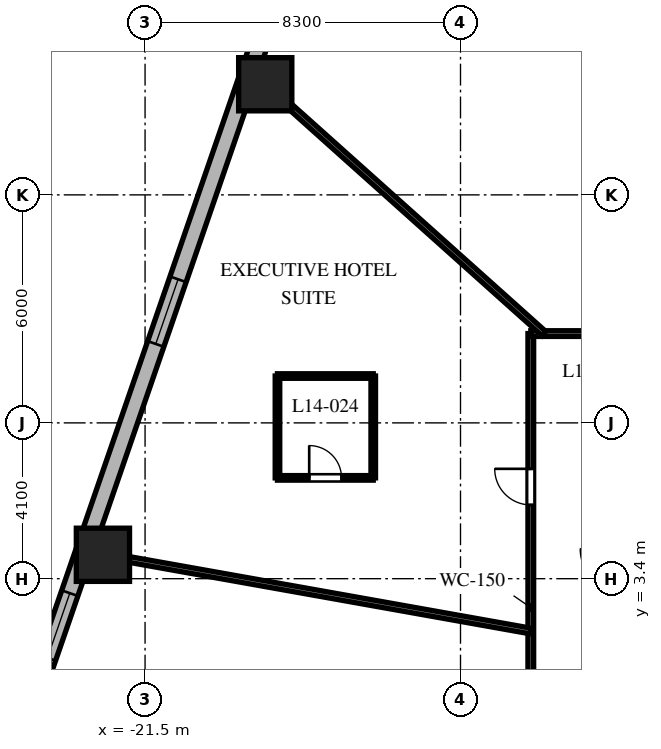
"""IFC4 building model, lengths in metres.
Left out: names, types, materials, properties, quantities, classifications, styles, units other than length and angle.
Written with IfcOpenShell. Run it as: python <this file> out.ifc"""

import sys

from ifc_helpers import new_model, si_unit, direction, frame, frame_2d, origin, origin_2d, place, context, subcontext, project, spatial, rectangle, extrude, element, fill, save


model = new_model("IFC4")
c1 = context("Model", 3, precision=1e-05, world=origin(), true_north=direction((0.0, 1.0)))
c2 = subcontext(c1, "Body", "Model", "MODEL_VIEW")
j1 = project(units=[si_unit("LENGTHUNIT", "METRE"), si_unit("PLANEANGLEUNIT", "RADIAN")], contexts=[c1])
p1 = place(None, origin())
s1 = spatial("IfcSite", under=j1, at=p1, CompositionType="ELEMENT")
p2 = place(p1, origin())
s2 = spatial("IfcBuilding", under=s1, at=p2, CompositionType="ELEMENT")
p3 = place(p2, frame((0.0, 0.0, 63.8)))
s3 = spatial("IfcBuildingStorey", under=s2, at=p3, CompositionType="ELEMENT", Elevation=63.8)
for number, where, z_axis, x_axis in (
    (1, (-18.338, 16.411, 0.0), (0.0, 0.0, 1.0), (1.0, 0.0, 0.0)),
    (2, (-22.609, 4.029, 0.0), (0.0, 0.0, 1.0), (1.0, 0.0, 0.0)),
):
    element("IfcColumn", number, at=place(p3, frame(where, z_axis=z_axis, x_axis=x_axis)), inside=s3, PredefinedType="COLUMN", context=c2, shape_type="SweptSolid", body=[
        extrude(rectangle(XDim=1.4, YDim=1.4, at=origin_2d()), origin(), (0.0, 0.0, 1.0), 3.7),
    ])
p4 = place(p3, frame((-17.39, 20.678, 0.0), z_axis=(0.0, 0.0, 1.0), x_axis=(-0.326068018294, -0.945346310854, 0.0)))
e3 = element("IfcWall", 3, at=p4, inside=s3, PredefinedType="SOLIDWALL", context=c2, shape_type="SweptSolid", body=[
    extrude(rectangle(XDim=21.793, YDim=0.45, at=frame_2d((10.896, 0.0))), origin(), (0.0, 0.0, 1.0), 3.4),
])
p5 = place(p4, frame((1.26, 0.0, 0.8)))
e4 = element("IfcOpeningElement", 4, at=p5, cuts=e3, PredefinedType="OPENING", context=c2, shape_type="SweptSolid", body=[
    extrude(rectangle(XDim=1.8, YDim=1.8, at=frame_2d((0.9, 0.9))), frame((0.0, 0.235, 0.0), z_axis=(0.0, -1.0, 0.0), x_axis=(1.0, 0.0, 0.0)), (0.0, 0.0, 1.0), 0.47),
])
p6 = place(p4, frame((9.943, 0.0, 0.8)))
e5 = element("IfcOpeningElement", 5, at=p6, cuts=e3, PredefinedType="OPENING", context=c2, shape_type="SweptSolid", body=[
    extrude(rectangle(XDim=1.8, YDim=1.8, at=frame_2d((0.9, 0.9))), frame((0.0, 0.235, 0.0), z_axis=(0.0, -1.0, 0.0), x_axis=(1.0, 0.0, 0.0)), (0.0, 0.0, 1.0), 0.47),
])
p7 = place(p4, frame((18.68, 0.0, 0.8)))
e6 = element("IfcOpeningElement", 6, at=p7, cuts=e3, PredefinedType="OPENING", context=c2, shape_type="SweptSolid", body=[
    extrude(rectangle(XDim=1.8, YDim=1.8, at=frame_2d((0.9, 0.9))), frame((0.0, 0.235, 0.0), z_axis=(0.0, -1.0, 0.0), x_axis=(1.0, 0.0, 0.0)), (0.0, 0.0, 1.0), 0.47),
])
p8 = place(p3, frame((-11.35, -9.85, 0.0), z_axis=(0.0, 0.0, 1.0), x_axis=(0.0, 1.0, 0.0)))
e7 = element("IfcWall", 7, at=p8, inside=s3, PredefinedType="PARTITIONING", context=c2, shape_type="SweptSolid", body=[
    extrude(rectangle(XDim=19.7, YDim=0.15, at=frame_2d((9.85, 0.0))), origin(), (0.0, 0.0, 1.0), 2.84),
])
p9 = place(p8, frame((15.191, 0.0, 0.0)))
e8 = element("IfcOpeningElement", 8, at=p9, cuts=e7, PredefinedType="OPENING", context=c2, shape_type="SweptSolid", body=[
    extrude(rectangle(XDim=0.95, YDim=2.03, at=frame_2d((0.475, 1.015))), frame((0.0, 0.085, 0.0), z_axis=(0.0, -1.0, 0.0), x_axis=(1.0, 0.0, 0.0)), (0.0, 0.0, 1.0), 0.17),
])
p10 = place(p8, frame((8.838, 0.0, 0.0)))
e9 = element("IfcOpeningElement", 9, at=p10, cuts=e7, PredefinedType="OPENING", context=c2, shape_type="SweptSolid", body=[
    extrude(rectangle(XDim=0.95, YDim=2.03, at=frame_2d((0.475, 1.015))), frame((0.0, 0.085, 0.0), z_axis=(0.0, -1.0, 0.0), x_axis=(1.0, 0.0, 0.0)), (0.0, 0.0, 1.0), 0.17),
])
p11 = place(p8, frame((4.704, 0.0, 0.0)))
e10 = element("IfcOpeningElement", 10, at=p11, cuts=e7, PredefinedType="OPENING", context=c2, shape_type="SweptSolid", body=[
    extrude(rectangle(XDim=0.95, YDim=2.03, at=frame_2d((0.475, 1.015))), frame((0.0, 0.085, 0.0), z_axis=(0.0, -1.0, 0.0), x_axis=(1.0, 0.0, 0.0)), (0.0, 0.0, 1.0), 0.17),
])
p12 = place(p8, frame((1.462, 0.0, 0.0)))
e11 = element("IfcOpeningElement", 11, at=p12, cuts=e7, PredefinedType="OPENING", context=c2, shape_type="SweptSolid", body=[
    extrude(rectangle(XDim=0.95, YDim=2.03, at=frame_2d((0.475, 1.015))), frame((0.0, 0.085, 0.0), z_axis=(0.0, -1.0, 0.0), x_axis=(1.0, 0.0, 0.0)), (0.0, 0.0, 1.0), 0.17),
])
p13 = place(p3, frame((-11.35, 9.85, 0.0), z_axis=(0.0, 0.0, 1.0), x_axis=(1.0, 0.0, 0.0)))
e12 = element("IfcWall", 12, at=p13, inside=s3, PredefinedType="PARTITIONING", context=c2, shape_type="SweptSolid", body=[
    extrude(rectangle(XDim=22.7, YDim=0.15, at=frame_2d((11.35, 0.0))), origin(), (0.0, 0.0, 1.0), 2.84),
])
p14 = place(p13, frame((17.225, 0.0, 0.0)))
e13 = element("IfcOpeningElement", 13, at=p14, cuts=e12, PredefinedType="OPENING", context=c2, shape_type="SweptSolid", body=[
    extrude(rectangle(XDim=0.95, YDim=2.03, at=frame_2d((0.475, 1.015))), frame((0.0, 0.085, 0.0), z_axis=(0.0, -1.0, 0.0), x_axis=(1.0, 0.0, 0.0)), (0.0, 0.0, 1.0), 0.17),
])
p15 = place(p13, frame((10.444, 0.0, 0.0)))
e14 = element("IfcOpeningElement", 14, at=p15, cuts=e12, PredefinedType="OPENING", context=c2, shape_type="SweptSolid", body=[
    extrude(rectangle(XDim=0.95, YDim=2.03, at=frame_2d((0.475, 1.015))), frame((0.0, 0.085, 0.0), z_axis=(0.0, -1.0, 0.0), x_axis=(1.0, 0.0, 0.0)), (0.0, 0.0, 1.0), 0.17),
])
p16 = place(p13, frame((3.369, 0.0, 0.0)))
e15 = element("IfcOpeningElement", 15, at=p16, cuts=e12, PredefinedType="OPENING", context=c2, shape_type="SweptSolid", body=[
    extrude(rectangle(XDim=0.95, YDim=2.03, at=frame_2d((0.475, 1.015))), frame((0.0, 0.085, 0.0), z_axis=(0.0, -1.0, 0.0), x_axis=(1.0, 0.0, 0.0)), (0.0, 0.0, 1.0), 0.17),
])
p17 = place(p3, frame((-11.007, 9.85, 0.0), z_axis=(0.0, 0.0, 1.0), x_axis=(-0.745177305978, 0.666866390407, 0.0)))
e16 = element("IfcWall", 16, at=p17, inside=s3, PredefinedType="PARTITIONING", context=c2, shape_type="SweptSolid", body=[
    extrude(rectangle(XDim=10.375, YDim=0.15, at=frame_2d((5.188, 0.0))), origin(), (0.0, 0.0, 1.0), 2.54),
])
p18 = place(p3, frame((-11.35, 2.023, 0.0), z_axis=(0.0, 0.0, 1.0), x_axis=(-0.984493741877, 0.17541970301, 0.0)))
e17 = element("IfcWall", 17, at=p18, inside=s3, PredefinedType="PARTITIONING", context=c2, shape_type="SweptSolid", body=[
    extrude(rectangle(XDim=11.937, YDim=0.15, at=frame_2d((5.969, 0.0))), origin(), (0.0, 0.0, 1.0), 2.54),
])
p19 = place(p3, frame((-18.016, 6.053, 0.0), z_axis=(0.0, 0.0, 1.0), x_axis=(1.0, 0.0, 0.0)))
e18 = element("IfcWall", 18, at=p19, inside=s3, PredefinedType="PARTITIONING", context=c2, shape_type="SweptSolid", body=[
    extrude(rectangle(XDim=2.52, YDim=0.12, at=frame_2d((1.26, 0.0))), origin(), (0.0, 0.0, 1.0), 2.972),
])
p20 = place(p19, frame((0.835, 0.0, 0.0)))
e19 = element("IfcOpeningElement", 19, at=p20, cuts=e18, PredefinedType="OPENING", context=c2, shape_type="SweptSolid", body=[
    extrude(rectangle(XDim=0.85, YDim=2.03, at=frame_2d((0.425, 1.015))), frame((0.0, 0.07, 0.0), z_axis=(0.0, -1.0, 0.0), x_axis=(1.0, 0.0, 0.0)), (0.0, 0.0, 1.0), 0.14),
])
p21 = place(p3, frame((-15.496, 6.053, 0.0), z_axis=(0.0, 0.0, 1.0), x_axis=(0.0, 1.0, 0.0)))
e20 = element("IfcWall", 20, at=p21, inside=s3, PredefinedType="PARTITIONING", context=c2, shape_type="SweptSolid", body=[
    extrude(rectangle(XDim=2.68, YDim=0.12, at=frame_2d((1.34, 0.0))), origin(), (0.0, 0.0, 1.0), 3.4),
])
p22 = place(p3, frame((-15.496, 8.733, 0.0), z_axis=(0.0, 0.0, 1.0), x_axis=(-1.0, 0.0, 0.0)))
e21 = element("IfcWall", 21, at=p22, inside=s3, PredefinedType="PARTITIONING", context=c2, shape_type="SweptSolid", body=[
    extrude(rectangle(XDim=2.52, YDim=0.12, at=frame_2d((1.26, 0.0))), origin(), (0.0, 0.0, 1.0), 2.972),
])
p23 = place(p3, frame((-18.016, 8.733, 0.0), z_axis=(0.0, 0.0, 1.0), x_axis=(0.0, -1.0, 0.0)))
e22 = element("IfcWall", 22, at=p23, inside=s3, PredefinedType="PARTITIONING", context=c2, shape_type="SweptSolid", body=[
    extrude(rectangle(XDim=2.68, YDim=0.12, at=frame_2d((1.34, 0.0))), origin(), (0.0, 0.0, 1.0), 2.972),
])
p24 = place(p6, origin())
e23 = element("IfcWindow", 23, at=p24, inside=s3, PartitioningType="SINGLE_PANEL", PredefinedType="WINDOW", context=c2, shape_type="SweptSolid", body=[
    extrude(rectangle(XDim=1.8, YDim=1.8, at=frame_2d((0.9, 0.9))), frame((0.0, 0.03, 0.0), z_axis=(0.0, -1.0, 0.0), x_axis=(1.0, 0.0, 0.0)), (0.0, 0.0, 1.0), 0.06),
])
fill(e5, e23)
p25 = place(p7, origin())
e24 = element("IfcWindow", 24, at=p25, inside=s3, PartitioningType="SINGLE_PANEL", PredefinedType="WINDOW", context=c2, shape_type="SweptSolid", body=[
    extrude(rectangle(XDim=1.8, YDim=1.8, at=frame_2d((0.9, 0.9))), frame((0.0, 0.03, 0.0), z_axis=(0.0, -1.0, 0.0), x_axis=(1.0, 0.0, 0.0)), (0.0, 0.0, 1.0), 0.06),
])
fill(e6, e24)
p26 = place(p9, origin())
e25 = element("IfcDoor", 25, at=p26, inside=s3, OperationType="SINGLE_SWING_RIGHT", PredefinedType="DOOR", context=c2, shape_type="SweptSolid", body=[
    extrude(rectangle(XDim=0.95, YDim=2.03, at=frame_2d((0.475, 1.015))), frame((0.0, 0.025, 0.0), z_axis=(0.0, -1.0, 0.0), x_axis=(1.0, 0.0, 0.0)), (0.0, 0.0, 1.0), 0.05),
])
fill(e8, e25)
p27 = place(p20, origin())
e26 = element("IfcDoor", 26, at=p27, inside=s3, OperationType="SINGLE_SWING_LEFT", PredefinedType="DOOR", context=c2, shape_type="SweptSolid", body=[
    extrude(rectangle(XDim=0.85, YDim=2.03, at=frame_2d((0.425, 1.015))), frame((0.0, 0.025, 0.0), z_axis=(0.0, -1.0, 0.0), x_axis=(1.0, 0.0, 0.0)), (0.0, 0.0, 1.0), 0.05),
])
fill(e19, e26)
save(model, sys.argv[1])
